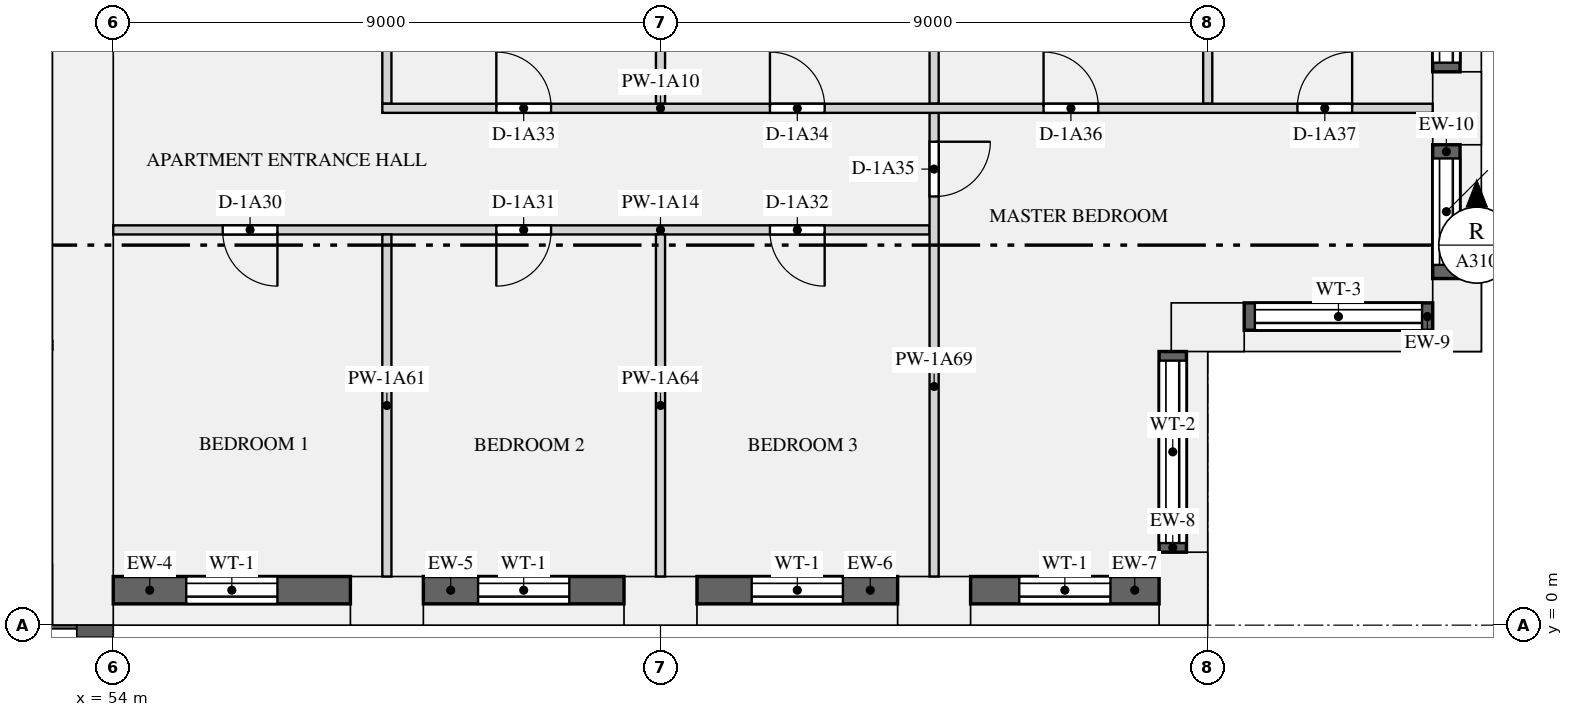
"""IFC4 building model, lengths in metres.
Left out: names, types, materials, properties, quantities, classifications, styles, units other than length and angle.
Written with IfcOpenShell. Run it as: python <this file> out.ifc"""

import sys

from ifc_helpers import new_model, si_unit, direction, frame, frame_2d, origin, origin_2d, place, context, subcontext, project, spatial, rectangle, extrude, element, fill, save


model = new_model("IFC4")
c1 = context("Model", 3, precision=1e-05, world=origin(), true_north=direction((0.0, 1.0)))
c2 = subcontext(c1, "Body", "Model", "MODEL_VIEW")
j1 = project(units=[si_unit("LENGTHUNIT", "METRE"), si_unit("PLANEANGLEUNIT", "RADIAN")], contexts=[c1])
p1 = place(None, origin())
s1 = spatial("IfcSite", under=j1, at=p1, CompositionType="ELEMENT")
p2 = place(p1, origin())
s2 = spatial("IfcBuilding", under=s1, at=p2, CompositionType="ELEMENT")
p3 = place(p2, frame((0.0, 0.0, 19.5)))
s3 = spatial("IfcBuildingStorey", under=s2, at=p3, CompositionType="ELEMENT", Elevation=19.5)
p4 = place(p3, frame((58.5, 0.4, -0.32), z_axis=(0.0, 0.0, 1.0), x_axis=(1.0, 0.0, 0.0)))
e1 = element("IfcColumn", 1, at=p4, inside=s3, PredefinedType="USERDEFINED", context=c2, shape_type="SweptSolid", body=[
    extrude(rectangle(XDim=1.2, YDim=0.8, at=origin_2d()), origin(), (0.0, 0.0, 1.0), 3.47),
])
p5 = place(p3, frame((63.0, 0.4, 0.0), z_axis=(0.0, 0.0, 1.0), x_axis=(1.0, 0.0, 0.0)))
e2 = element("IfcColumn", 2, at=p5, inside=s3, PredefinedType="USERDEFINED", context=c2, shape_type="SweptSolid", body=[
    extrude(rectangle(XDim=1.2, YDim=0.8, at=origin_2d()), origin(), (0.0, 0.0, 1.0), 3.15),
])
p6 = place(p3, frame((67.5, 0.4, -0.32), z_axis=(0.0, 0.0, 1.0), x_axis=(1.0, 0.0, 0.0)))
e3 = element("IfcColumn", 3, at=p6, inside=s3, PredefinedType="USERDEFINED", context=c2, shape_type="SweptSolid", body=[
    extrude(rectangle(XDim=1.2, YDim=0.8, at=origin_2d()), origin(), (0.0, 0.0, 1.0), 3.47),
])
for number, where, z_axis, x_axis in (
    (4, (71.6, 0.6, 0.0), (0.0, 0.0, 1.0), (0.0, 1.0, 0.0)),
    (5, (72.0, 4.9, 0.0), (0.0, 0.0, 1.0), (1.0, 0.0, 0.0)),
    (6, (76.1, 5.1, 0.0), (0.0, 0.0, 1.0), (0.0, 1.0, 0.0)),
):
    element("IfcColumn", number, at=place(p3, frame(where, z_axis=z_axis, x_axis=x_axis)), inside=s3, PredefinedType="USERDEFINED", context=c2, shape_type="SweptSolid", body=[
        extrude(rectangle(XDim=1.2, YDim=0.8, at=origin_2d()), origin(), (0.0, 0.0, 1.0), 3.15),
    ])
p7 = place(p3, frame((76.1, 8.5, -0.32), z_axis=(0.0, 0.0, 1.0), x_axis=(0.0, 1.0, 0.0)))
e7 = element("IfcColumn", 7, at=p7, inside=s3, PredefinedType="USERDEFINED", context=c2, shape_type="SweptSolid", body=[
    extrude(rectangle(XDim=1.2, YDim=0.8, at=origin_2d()), origin(), (0.0, 0.0, 1.0), 3.47),
])
p8 = place(p3, frame((53.5, 0.0, 0.0), z_axis=(0.0, 0.0, 1.0), x_axis=(0.0, 1.0, 0.0)))
e8 = element("IfcWall", 8, at=p8, inside=s3, PredefinedType="SHEAR", context=c2, shape_type="SweptSolid", body=[
    extrude(rectangle(XDim=12.5, YDim=1.0, at=frame_2d((6.25, 0.0))), origin(), (0.0, 0.0, 1.0), 3.15),
])
p9 = place(p3, frame((54.0, 0.575, 0.9), z_axis=(0.0, 0.0, 1.0), x_axis=(1.0, 0.0, 0.0)))
e9 = element("IfcWall", 9, at=p9, inside=s3, PredefinedType="SOLIDWALL", context=c2, shape_type="SweptSolid", body=[
    extrude(rectangle(XDim=3.9, YDim=0.45, at=frame_2d((1.95, 0.0))), origin(), (0.0, 0.0, 1.0), 1.93),
])
p10 = place(p9, frame((1.2, 0.0, 0.15)))
e10 = element("IfcOpeningElement", 10, at=p10, cuts=e9, PredefinedType="OPENING", context=c2, shape_type="SweptSolid", body=[
    extrude(rectangle(XDim=1.5, YDim=1.5, at=frame_2d((0.75, 0.75))), frame((0.0, 0.235, 0.0), z_axis=(0.0, -1.0, 0.0), x_axis=(1.0, 0.0, 0.0)), (0.0, 0.0, 1.0), 0.47),
])
p11 = place(p3, frame((59.1, 0.575, 0.9), z_axis=(0.0, 0.0, 1.0), x_axis=(1.0, 0.0, 0.0)))
e11 = element("IfcWall", 11, at=p11, inside=s3, PredefinedType="SOLIDWALL", context=c2, shape_type="SweptSolid", body=[
    extrude(rectangle(XDim=3.3, YDim=0.45, at=frame_2d((1.65, 0.0))), origin(), (0.0, 0.0, 1.0), 1.93),
])
p12 = place(p11, frame((0.9, 0.0, 0.15)))
e12 = element("IfcOpeningElement", 12, at=p12, cuts=e11, PredefinedType="OPENING", context=c2, shape_type="SweptSolid", body=[
    extrude(rectangle(XDim=1.5, YDim=1.5, at=frame_2d((0.75, 0.75))), frame((0.0, 0.235, 0.0), z_axis=(0.0, -1.0, 0.0), x_axis=(1.0, 0.0, 0.0)), (0.0, 0.0, 1.0), 0.47),
])
p13 = place(p3, frame((63.6, 0.575, 0.9), z_axis=(0.0, 0.0, 1.0), x_axis=(1.0, 0.0, 0.0)))
e13 = element("IfcWall", 13, at=p13, inside=s3, PredefinedType="SOLIDWALL", context=c2, shape_type="SweptSolid", body=[
    extrude(rectangle(XDim=3.3, YDim=0.45, at=frame_2d((1.65, 0.0))), origin(), (0.0, 0.0, 1.0), 1.93),
])
p14 = place(p13, frame((0.9, 0.0, 0.15)))
e14 = element("IfcOpeningElement", 14, at=p14, cuts=e13, PredefinedType="OPENING", context=c2, shape_type="SweptSolid", body=[
    extrude(rectangle(XDim=1.5, YDim=1.5, at=frame_2d((0.75, 0.75))), frame((0.0, 0.235, 0.0), z_axis=(0.0, -1.0, 0.0), x_axis=(1.0, 0.0, 0.0)), (0.0, 0.0, 1.0), 0.47),
])
p15 = place(p3, frame((68.1, 0.575, 0.9), z_axis=(0.0, 0.0, 1.0), x_axis=(1.0, 0.0, 0.0)))
e15 = element("IfcWall", 15, at=p15, inside=s3, PredefinedType="SOLIDWALL", context=c2, shape_type="SweptSolid", body=[
    extrude(rectangle(XDim=3.1, YDim=0.45, at=frame_2d((1.55, 0.0))), origin(), (0.0, 0.0, 1.0), 1.93),
])
p16 = place(p15, frame((0.8, 0.0, 0.15)))
e16 = element("IfcOpeningElement", 16, at=p16, cuts=e15, PredefinedType="OPENING", context=c2, shape_type="SweptSolid", body=[
    extrude(rectangle(XDim=1.5, YDim=1.5, at=frame_2d((0.75, 0.75))), frame((0.0, 0.235, 0.0), z_axis=(0.0, -1.0, 0.0), x_axis=(1.0, 0.0, 0.0)), (0.0, 0.0, 1.0), 0.47),
])
p17 = place(p3, frame((71.425, 1.2, 0.9), z_axis=(0.0, 0.0, 1.0), x_axis=(0.0, 1.0, 0.0)))
e17 = element("IfcWall", 17, at=p17, inside=s3, PredefinedType="SOLIDWALL", context=c2, shape_type="SweptSolid", body=[
    extrude(rectangle(XDim=3.3, YDim=0.45, at=frame_2d((1.65, 0.0))), origin(), (0.0, 0.0, 1.0), 1.93),
])
p18 = place(p17, frame((0.15, 0.0, 0.15)))
e18 = element("IfcOpeningElement", 18, at=p18, cuts=e17, PredefinedType="OPENING", context=c2, shape_type="SweptSolid", body=[
    extrude(rectangle(XDim=3.0, YDim=1.5, at=frame_2d((1.5, 0.75))), frame((0.0, 0.235, 0.0), z_axis=(0.0, -1.0, 0.0), x_axis=(1.0, 0.0, 0.0)), (0.0, 0.0, 1.0), 0.47),
])
p19 = place(p3, frame((72.6, 5.075, 0.9), z_axis=(0.0, 0.0, 1.0), x_axis=(1.0, 0.0, 0.0)))
e19 = element("IfcWall", 19, at=p19, inside=s3, PredefinedType="SOLIDWALL", context=c2, shape_type="SweptSolid", body=[
    extrude(rectangle(XDim=3.1, YDim=0.45, at=frame_2d((1.55, 0.0))), origin(), (0.0, 0.0, 1.0), 1.93),
])
p20 = place(p19, frame((0.175, 0.0, 0.15)))
e20 = element("IfcOpeningElement", 20, at=p20, cuts=e19, PredefinedType="OPENING", context=c2, shape_type="SweptSolid", body=[
    extrude(rectangle(XDim=2.75, YDim=1.5, at=frame_2d((1.375, 0.75))), frame((0.0, 0.235, 0.0), z_axis=(0.0, -1.0, 0.0), x_axis=(1.0, 0.0, 0.0)), (0.0, 0.0, 1.0), 0.47),
])
p21 = place(p3, frame((75.925, 5.7, 0.9), z_axis=(0.0, 0.0, 1.0), x_axis=(0.0, 1.0, 0.0)))
e21 = element("IfcWall", 21, at=p21, inside=s3, PredefinedType="SOLIDWALL", context=c2, shape_type="SweptSolid", body=[
    extrude(rectangle(XDim=2.2, YDim=0.45, at=frame_2d((1.1, 0.0))), origin(), (0.0, 0.0, 1.0), 1.93),
])
p22 = place(p21, frame((0.225, 0.0, 0.15)))
e22 = element("IfcOpeningElement", 22, at=p22, cuts=e21, PredefinedType="OPENING", context=c2, shape_type="SweptSolid", body=[
    extrude(rectangle(XDim=1.75, YDim=1.5, at=frame_2d((0.875, 0.75))), frame((0.0, 0.235, 0.0), z_axis=(0.0, -1.0, 0.0), x_axis=(1.0, 0.0, 0.0)), (0.0, 0.0, 1.0), 0.47),
])
p23 = place(p3, frame((75.925, 9.1, 0.9), z_axis=(0.0, 0.0, 1.0), x_axis=(0.0, 1.0, 0.0)))
e23 = element("IfcWall", 23, at=p23, inside=s3, PredefinedType="SOLIDWALL", context=c2, shape_type="SweptSolid", body=[
    extrude(rectangle(XDim=2.8, YDim=0.45, at=frame_2d((1.4, 0.0))), origin(), (0.0, 0.0, 1.0), 1.93),
])
p24 = place(p23, frame((0.15, 0.0, 0.15)))
e24 = element("IfcOpeningElement", 24, at=p24, cuts=e23, PredefinedType="OPENING", context=c2, shape_type="SweptSolid", body=[
    extrude(rectangle(XDim=2.5, YDim=1.5, at=frame_2d((1.25, 0.75))), frame((0.0, 0.235, 0.0), z_axis=(0.0, -1.0, 0.0), x_axis=(1.0, 0.0, 0.0)), (0.0, 0.0, 1.0), 0.47),
])
p25 = place(p3, frame((58.425, 8.5, 0.0), z_axis=(0.0, 0.0, 1.0), x_axis=(1.0, 0.0, 0.0)))
e25 = element("IfcWall", 25, at=p25, inside=s3, PredefinedType="PARTITIONING", context=c2, shape_type="SweptSolid", body=[
    extrude(rectangle(XDim=17.275, YDim=0.15, at=frame_2d((8.637, 0.0))), origin(), (0.0, 0.0, 1.0), 2.83),
])
p26 = place(p25, frame((1.875, 0.0, 0.0)))
e26 = element("IfcOpeningElement", 26, at=p26, cuts=e25, PredefinedType="OPENING", context=c2, shape_type="SweptSolid", body=[
    extrude(rectangle(XDim=0.9, YDim=2.1, at=frame_2d((0.45, 1.05))), frame((0.0, 0.085, 0.0), z_axis=(0.0, -1.0, 0.0), x_axis=(1.0, 0.0, 0.0)), (0.0, 0.0, 1.0), 0.17),
])
p27 = place(p25, frame((6.375, 0.0, 0.0)))
e27 = element("IfcOpeningElement", 27, at=p27, cuts=e25, PredefinedType="OPENING", context=c2, shape_type="SweptSolid", body=[
    extrude(rectangle(XDim=0.9, YDim=2.1, at=frame_2d((0.45, 1.05))), frame((0.0, 0.085, 0.0), z_axis=(0.0, -1.0, 0.0), x_axis=(1.0, 0.0, 0.0)), (0.0, 0.0, 1.0), 0.17),
])
p28 = place(p25, frame((10.875, 0.0, 0.0)))
e28 = element("IfcOpeningElement", 28, at=p28, cuts=e25, PredefinedType="OPENING", context=c2, shape_type="SweptSolid", body=[
    extrude(rectangle(XDim=0.9, YDim=2.1, at=frame_2d((0.45, 1.05))), frame((0.0, 0.085, 0.0), z_axis=(0.0, -1.0, 0.0), x_axis=(1.0, 0.0, 0.0)), (0.0, 0.0, 1.0), 0.17),
])
p29 = place(p25, frame((15.05, 0.0, 0.0)))
e29 = element("IfcOpeningElement", 29, at=p29, cuts=e25, PredefinedType="OPENING", context=c2, shape_type="SweptSolid", body=[
    extrude(rectangle(XDim=0.9, YDim=2.1, at=frame_2d((0.45, 1.05))), frame((0.0, 0.085, 0.0), z_axis=(0.0, -1.0, 0.0), x_axis=(1.0, 0.0, 0.0)), (0.0, 0.0, 1.0), 0.17),
])
p30 = place(p3, frame((54.0, 6.5, 0.0), z_axis=(0.0, 0.0, 1.0), x_axis=(1.0, 0.0, 0.0)))
e30 = element("IfcWall", 30, at=p30, inside=s3, PredefinedType="PARTITIONING", context=c2, shape_type="SweptSolid", body=[
    extrude(rectangle(XDim=13.425, YDim=0.15, at=frame_2d((6.712, 0.0))), origin(), (0.0, 0.0, 1.0), 2.83),
])
p31 = place(p30, frame((1.8, 0.0, 0.0)))
e31 = element("IfcOpeningElement", 31, at=p31, cuts=e30, PredefinedType="OPENING", context=c2, shape_type="SweptSolid", body=[
    extrude(rectangle(XDim=0.9, YDim=2.1, at=frame_2d((0.45, 1.05))), frame((0.0, 0.085, 0.0), z_axis=(0.0, -1.0, 0.0), x_axis=(1.0, 0.0, 0.0)), (0.0, 0.0, 1.0), 0.17),
])
p32 = place(p30, frame((6.3, 0.0, 0.0)))
e32 = element("IfcOpeningElement", 32, at=p32, cuts=e30, PredefinedType="OPENING", context=c2, shape_type="SweptSolid", body=[
    extrude(rectangle(XDim=0.9, YDim=2.1, at=frame_2d((0.45, 1.05))), frame((0.0, 0.085, 0.0), z_axis=(0.0, -1.0, 0.0), x_axis=(1.0, 0.0, 0.0)), (0.0, 0.0, 1.0), 0.17),
])
p33 = place(p30, frame((10.8, 0.0, 0.0)))
e33 = element("IfcOpeningElement", 33, at=p33, cuts=e30, PredefinedType="OPENING", context=c2, shape_type="SweptSolid", body=[
    extrude(rectangle(XDim=0.9, YDim=2.1, at=frame_2d((0.45, 1.05))), frame((0.0, 0.085, 0.0), z_axis=(0.0, -1.0, 0.0), x_axis=(1.0, 0.0, 0.0)), (0.0, 0.0, 1.0), 0.17),
])
p34 = place(p3, frame((58.5, 0.8, 0.0), z_axis=(0.0, 0.0, 1.0), x_axis=(0.0, 1.0, 0.0)))
e34 = element("IfcWall", 34, at=p34, inside=s3, PredefinedType="PARTITIONING", context=c2, shape_type="SweptSolid", body=[
    extrude(rectangle(XDim=5.625, YDim=0.15, at=frame_2d((2.812, 0.0))), origin(), (0.0, 0.0, 1.0), 2.83),
])
p35 = place(p3, frame((58.5, 8.575, 0.0), z_axis=(0.0, 0.0, 1.0), x_axis=(0.0, 1.0, 0.0)))
e35 = element("IfcWall", 35, at=p35, inside=s3, PredefinedType="PARTITIONING", context=c2, shape_type="SweptSolid", body=[
    extrude(rectangle(XDim=14.325, YDim=0.15, at=frame_2d((7.163, 0.0))), origin(), (0.0, 0.0, 1.0), 2.83),
])
p36 = place(p35, frame((6.475, 0.0, 0.0)))
e36 = element("IfcOpeningElement", 36, at=p36, cuts=e35, PredefinedType="OPENING", context=c2, shape_type="SweptSolid", body=[
    extrude(rectangle(XDim=0.9, YDim=2.1, at=frame_2d((0.45, 1.05))), frame((0.0, 0.085, 0.0), z_axis=(0.0, -1.0, 0.0), x_axis=(1.0, 0.0, 0.0)), (0.0, 0.0, 1.0), 0.17),
])
p37 = place(p35, frame((11.75, 0.0, 0.0)))
e37 = element("IfcOpeningElement", 37, at=p37, cuts=e35, PredefinedType="OPENING", context=c2, shape_type="SweptSolid", body=[
    extrude(rectangle(XDim=0.9, YDim=2.1, at=frame_2d((0.45, 1.05))), frame((0.0, 0.085, 0.0), z_axis=(0.0, -1.0, 0.0), x_axis=(1.0, 0.0, 0.0)), (0.0, 0.0, 1.0), 0.17),
])
p38 = place(p3, frame((63.0, 0.8, 0.0), z_axis=(0.0, 0.0, 1.0), x_axis=(0.0, 1.0, 0.0)))
e38 = element("IfcWall", 38, at=p38, inside=s3, PredefinedType="PARTITIONING", context=c2, shape_type="SweptSolid", body=[
    extrude(rectangle(XDim=5.625, YDim=0.15, at=frame_2d((2.812, 0.0))), origin(), (0.0, 0.0, 1.0), 2.83),
])
p39 = place(p3, frame((63.0, 8.575, 0.0), z_axis=(0.0, 0.0, 1.0), x_axis=(0.0, 1.0, 0.0)))
e39 = element("IfcWall", 39, at=p39, inside=s3, PredefinedType="PARTITIONING", context=c2, shape_type="SweptSolid", body=[
    extrude(rectangle(XDim=3.85, YDim=0.15, at=frame_2d((1.925, 0.0))), origin(), (0.0, 0.0, 1.0), 2.83),
])
p40 = place(p3, frame((67.5, 0.8, 0.0), z_axis=(0.0, 0.0, 1.0), x_axis=(0.0, 1.0, 0.0)))
e40 = element("IfcWall", 40, at=p40, inside=s3, PredefinedType="PARTITIONING", context=c2, shape_type="SweptSolid", body=[
    extrude(rectangle(XDim=7.625, YDim=0.15, at=frame_2d((3.812, 0.0))), origin(), (0.0, 0.0, 1.0), 2.83),
])
p41 = place(p40, frame((6.25, 0.0, 0.0)))
e41 = element("IfcOpeningElement", 41, at=p41, cuts=e40, PredefinedType="OPENING", context=c2, shape_type="SweptSolid", body=[
    extrude(rectangle(XDim=0.9, YDim=2.1, at=frame_2d((0.45, 1.05))), frame((0.0, 0.085, 0.0), z_axis=(0.0, -1.0, 0.0), x_axis=(1.0, 0.0, 0.0)), (0.0, 0.0, 1.0), 0.17),
])
for number, where, z_axis, x_axis in (
    (42, (67.5, 8.575, 0.0), (0.0, 0.0, 1.0), (0.0, 1.0, 0.0)),
    (43, (72.0, 8.575, 0.0), (0.0, 0.0, 1.0), (0.0, 1.0, 0.0)),
):
    element("IfcWall", number, at=place(p3, frame(where, z_axis=z_axis, x_axis=x_axis)), inside=s3, PredefinedType="PARTITIONING", context=c2, shape_type="SweptSolid", body=[
        extrude(rectangle(XDim=3.85, YDim=0.15, at=frame_2d((1.925, 0.0))), origin(), (0.0, 0.0, 1.0), 2.83),
    ])
p42 = place(p10, origin())
e44 = element("IfcWindow", 44, at=p42, inside=s3, PartitioningType="SINGLE_PANEL", PredefinedType="WINDOW", context=c2, shape_type="SweptSolid", body=[
    extrude(rectangle(XDim=1.5, YDim=1.5, at=frame_2d((0.75, 0.75))), frame((0.0, -0.065, 0.0), z_axis=(0.0, -1.0, 0.0), x_axis=(1.0, 0.0, 0.0)), (0.0, 0.0, 1.0), 0.06),
])
fill(e10, e44)
p43 = place(p12, origin())
e45 = element("IfcWindow", 45, at=p43, inside=s3, PartitioningType="SINGLE_PANEL", PredefinedType="WINDOW", context=c2, shape_type="SweptSolid", body=[
    extrude(rectangle(XDim=1.5, YDim=1.5, at=frame_2d((0.75, 0.75))), frame((0.0, -0.065, 0.0), z_axis=(0.0, -1.0, 0.0), x_axis=(1.0, 0.0, 0.0)), (0.0, 0.0, 1.0), 0.06),
])
fill(e12, e45)
p44 = place(p14, origin())
e46 = element("IfcWindow", 46, at=p44, inside=s3, PartitioningType="SINGLE_PANEL", PredefinedType="WINDOW", context=c2, shape_type="SweptSolid", body=[
    extrude(rectangle(XDim=1.5, YDim=1.5, at=frame_2d((0.75, 0.75))), frame((0.0, -0.065, 0.0), z_axis=(0.0, -1.0, 0.0), x_axis=(1.0, 0.0, 0.0)), (0.0, 0.0, 1.0), 0.06),
])
fill(e14, e46)
p45 = place(p16, origin())
e47 = element("IfcWindow", 47, at=p45, inside=s3, PartitioningType="SINGLE_PANEL", PredefinedType="WINDOW", context=c2, shape_type="SweptSolid", body=[
    extrude(rectangle(XDim=1.5, YDim=1.5, at=frame_2d((0.75, 0.75))), frame((0.0, -0.065, 0.0), z_axis=(0.0, -1.0, 0.0), x_axis=(1.0, 0.0, 0.0)), (0.0, 0.0, 1.0), 0.06),
])
fill(e16, e47)
p46 = place(p18, origin())
e48 = element("IfcWindow", 48, at=p46, inside=s3, PartitioningType="SINGLE_PANEL", PredefinedType="WINDOW", context=c2, shape_type="SweptSolid", body=[
    extrude(rectangle(XDim=3.0, YDim=1.5, at=frame_2d((1.5, 0.75))), frame((0.0, -0.065, 0.0), z_axis=(0.0, -1.0, 0.0), x_axis=(1.0, 0.0, 0.0)), (0.0, 0.0, 1.0), 0.06),
])
fill(e18, e48)
p47 = place(p20, origin())
e49 = element("IfcWindow", 49, at=p47, inside=s3, PartitioningType="SINGLE_PANEL", PredefinedType="WINDOW", context=c2, shape_type="SweptSolid", body=[
    extrude(rectangle(XDim=2.75, YDim=1.5, at=frame_2d((1.375, 0.75))), frame((0.0, -0.065, 0.0), z_axis=(0.0, -1.0, 0.0), x_axis=(1.0, 0.0, 0.0)), (0.0, 0.0, 1.0), 0.06),
])
fill(e20, e49)
p48 = place(p22, origin())
e50 = element("IfcWindow", 50, at=p48, inside=s3, PartitioningType="SINGLE_PANEL", PredefinedType="WINDOW", context=c2, shape_type="SweptSolid", body=[
    extrude(rectangle(XDim=1.75, YDim=1.5, at=frame_2d((0.875, 0.75))), frame((0.0, -0.065, 0.0), z_axis=(0.0, -1.0, 0.0), x_axis=(1.0, 0.0, 0.0)), (0.0, 0.0, 1.0), 0.06),
])
fill(e22, e50)
p49 = place(p24, origin())
e51 = element("IfcWindow", 51, at=p49, inside=s3, PartitioningType="SINGLE_PANEL", PredefinedType="WINDOW", context=c2, shape_type="SweptSolid", body=[
    extrude(rectangle(XDim=2.5, YDim=1.5, at=frame_2d((1.25, 0.75))), frame((0.0, -0.065, 0.0), z_axis=(0.0, -1.0, 0.0), x_axis=(1.0, 0.0, 0.0)), (0.0, 0.0, 1.0), 0.06),
])
fill(e24, e51)
p50 = place(p31, frame((0.9, 0.0, 0.0), z_axis=(0.0, 0.0, 1.0), x_axis=(-1.0, 0.0, 0.0)))
e52 = element("IfcDoor", 52, at=p50, inside=s3, OperationType="SINGLE_SWING_LEFT", PredefinedType="DOOR", context=c2, shape_type="SweptSolid", body=[
    extrude(rectangle(XDim=0.9, YDim=2.1, at=frame_2d((0.45, 1.05))), frame((0.0, 0.025, 0.0), z_axis=(0.0, -1.0, 0.0), x_axis=(1.0, 0.0, 0.0)), (0.0, 0.0, 1.0), 0.05),
])
fill(e31, e52)
p51 = place(p32, frame((0.9, 0.0, 0.0), z_axis=(0.0, 0.0, 1.0), x_axis=(-1.0, 0.0, 0.0)))
e53 = element("IfcDoor", 53, at=p51, inside=s3, OperationType="SINGLE_SWING_RIGHT", PredefinedType="DOOR", context=c2, shape_type="SweptSolid", body=[
    extrude(rectangle(XDim=0.9, YDim=2.1, at=frame_2d((0.45, 1.05))), frame((0.0, 0.025, 0.0), z_axis=(0.0, -1.0, 0.0), x_axis=(1.0, 0.0, 0.0)), (0.0, 0.0, 1.0), 0.05),
])
fill(e32, e53)
p52 = place(p33, frame((0.9, 0.0, 0.0), z_axis=(0.0, 0.0, 1.0), x_axis=(-1.0, 0.0, 0.0)))
e54 = element("IfcDoor", 54, at=p52, inside=s3, OperationType="SINGLE_SWING_LEFT", PredefinedType="DOOR", context=c2, shape_type="SweptSolid", body=[
    extrude(rectangle(XDim=0.9, YDim=2.1, at=frame_2d((0.45, 1.05))), frame((0.0, 0.025, 0.0), z_axis=(0.0, -1.0, 0.0), x_axis=(1.0, 0.0, 0.0)), (0.0, 0.0, 1.0), 0.05),
])
fill(e33, e54)
p53 = place(p26, origin())
e55 = element("IfcDoor", 55, at=p53, inside=s3, OperationType="SINGLE_SWING_LEFT", PredefinedType="DOOR", context=c2, shape_type="SweptSolid", body=[
    extrude(rectangle(XDim=0.9, YDim=2.1, at=frame_2d((0.45, 1.05))), frame((0.0, 0.025, 0.0), z_axis=(0.0, -1.0, 0.0), x_axis=(1.0, 0.0, 0.0)), (0.0, 0.0, 1.0), 0.05),
])
fill(e26, e55)
p54 = place(p27, origin())
e56 = element("IfcDoor", 56, at=p54, inside=s3, OperationType="SINGLE_SWING_LEFT", PredefinedType="DOOR", context=c2, shape_type="SweptSolid", body=[
    extrude(rectangle(XDim=0.9, YDim=2.1, at=frame_2d((0.45, 1.05))), frame((0.0, 0.025, 0.0), z_axis=(0.0, -1.0, 0.0), x_axis=(1.0, 0.0, 0.0)), (0.0, 0.0, 1.0), 0.05),
])
fill(e27, e56)
p55 = place(p41, frame((0.9, 0.0, 0.0), z_axis=(0.0, 0.0, 1.0), x_axis=(-1.0, 0.0, 0.0)))
e57 = element("IfcDoor", 57, at=p55, inside=s3, OperationType="SINGLE_SWING_LEFT", PredefinedType="DOOR", context=c2, shape_type="SweptSolid", body=[
    extrude(rectangle(XDim=0.9, YDim=2.1, at=frame_2d((0.45, 1.05))), frame((0.0, 0.025, 0.0), z_axis=(0.0, -1.0, 0.0), x_axis=(1.0, 0.0, 0.0)), (0.0, 0.0, 1.0), 0.05),
])
fill(e41, e57)
p56 = place(p28, origin())
e58 = element("IfcDoor", 58, at=p56, inside=s3, OperationType="SINGLE_SWING_LEFT", PredefinedType="DOOR", context=c2, shape_type="SweptSolid", body=[
    extrude(rectangle(XDim=0.9, YDim=2.1, at=frame_2d((0.45, 1.05))), frame((0.0, 0.025, 0.0), z_axis=(0.0, -1.0, 0.0), x_axis=(1.0, 0.0, 0.0)), (0.0, 0.0, 1.0), 0.05),
])
fill(e28, e58)
p57 = place(p29, origin())
e59 = element("IfcDoor", 59, at=p57, inside=s3, OperationType="SINGLE_SWING_RIGHT", PredefinedType="DOOR", context=c2, shape_type="SweptSolid", body=[
    extrude(rectangle(XDim=0.9, YDim=2.1, at=frame_2d((0.45, 1.05))), frame((0.0, 0.025, 0.0), z_axis=(0.0, -1.0, 0.0), x_axis=(1.0, 0.0, 0.0)), (0.0, 0.0, 1.0), 0.05),
])
fill(e29, e59)
save(model, sys.argv[1])
